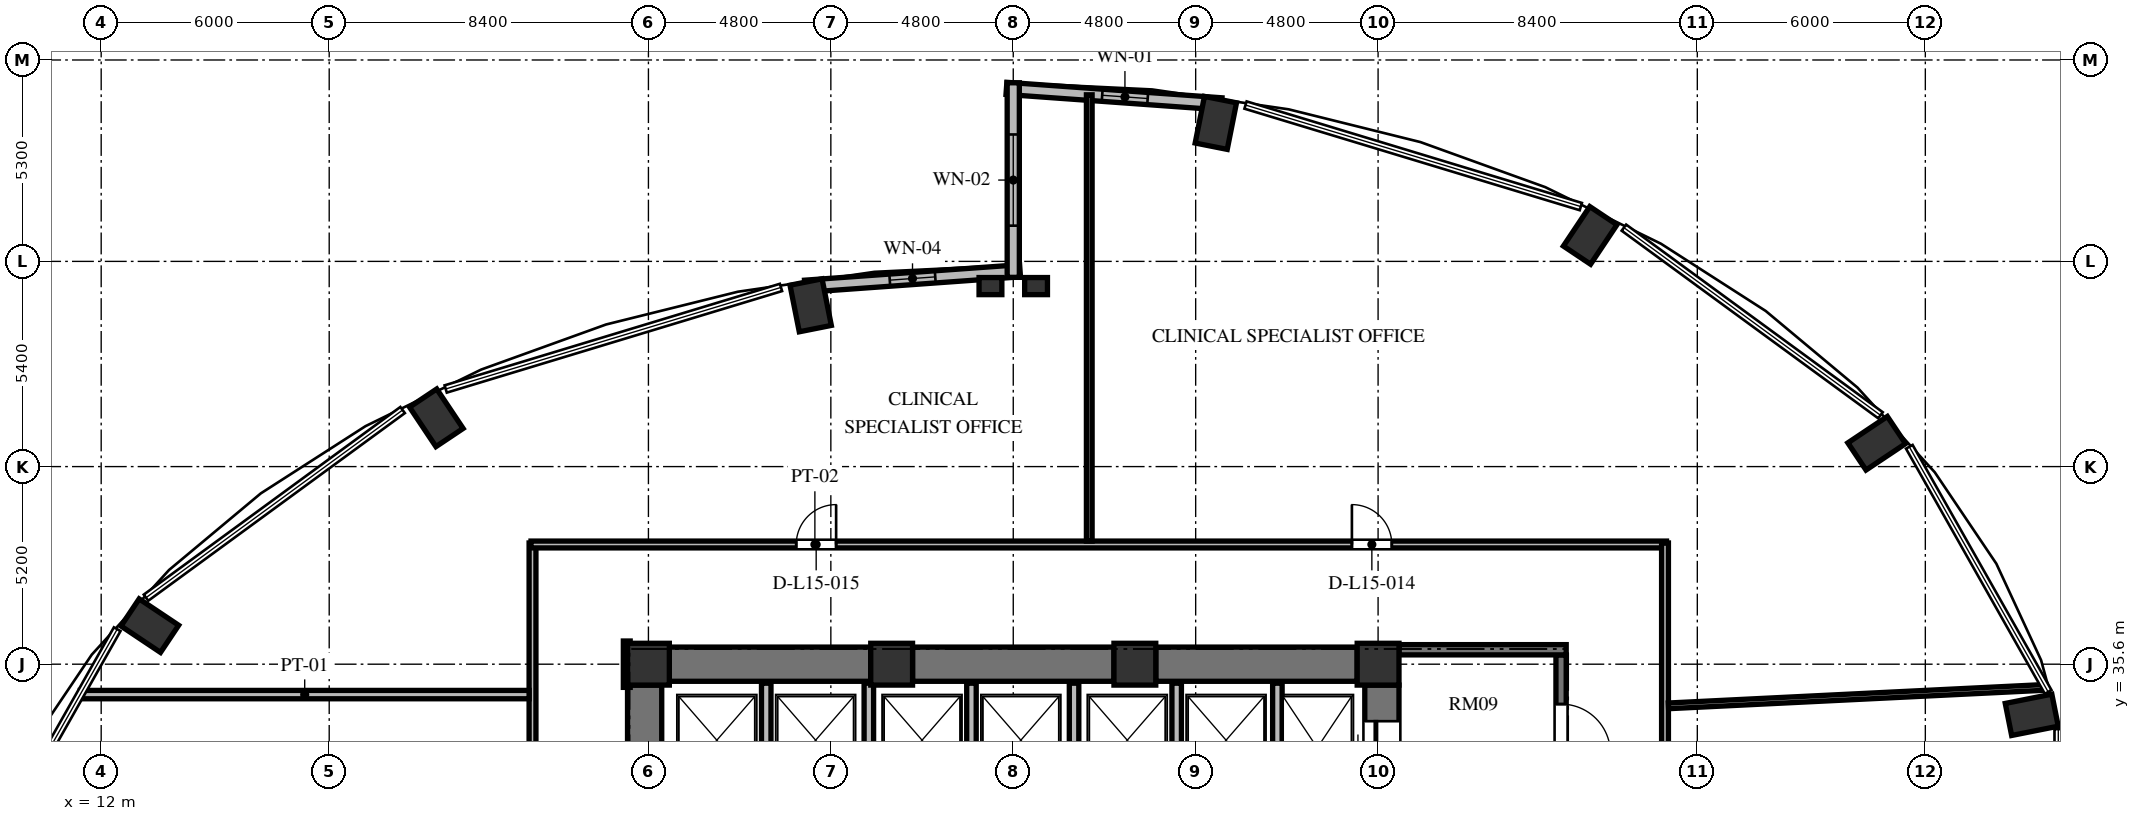
"""IFC4 building model, lengths in metres.
Left out: names, types, materials, properties, quantities, classifications, styles, units other than length and angle.
Written with IfcOpenShell. Run it as: python <this file> out.ifc"""

import sys

from ifc_helpers import new_model, si_unit, direction, frame, frame_2d, origin, origin_2d, place, context, subcontext, project, spatial, rectangle, extrude, element, fill, save


model = new_model("IFC4")
c1 = context("Model", 3, precision=1e-05, world=origin(), true_north=direction((0.0, 1.0)))
c2 = subcontext(c1, "Body", "Model", "MODEL_VIEW")
j1 = project(units=[si_unit("LENGTHUNIT", "METRE"), si_unit("PLANEANGLEUNIT", "RADIAN")], contexts=[c1])
p1 = place(None, origin())
s1 = spatial("IfcSite", under=j1, at=p1, CompositionType="ELEMENT")
p2 = place(p1, origin())
s2 = spatial("IfcBuilding", under=s1, at=p2, CompositionType="ELEMENT")
p3 = place(p2, frame((0.0, 0.0, 61.68)))
s3 = spatial("IfcBuildingStorey", under=s2, at=p3, CompositionType="ELEMENT", Elevation=61.68)
for number, where, z_axis, x_axis in (
    (1, (62.8, 34.268, 0.0), (0.0, 0.0, 1.0), (0.981, 0.195, 0.0)),
    (2, (58.72, 41.414, 0.0), (0.0, 0.0, 1.0), (0.831, 0.556, 0.0)),
    (3, (51.181, 46.884, 0.0), (0.0, 0.0, 1.0), (0.556, 0.831, 0.0)),
    (4, (41.331, 49.844, 0.0), (0.0, 0.0, 1.0), (0.195, 0.981, 0.0)),
    (5, (30.669, 45.044, 0.0), (0.0, 0.0, 1.0), (-0.195, 0.981, 0.0)),
    (6, (20.819, 42.084, 0.0), (0.0, 0.0, 1.0), (-0.556, 0.831, 0.0)),
    (7, (13.28, 36.614, 0.0), (0.0, 0.0, 1.0), (-0.831, 0.556, 0.0)),
):
    element("IfcColumn", number, at=place(p3, frame(where, z_axis=z_axis, x_axis=x_axis)), inside=s3, PredefinedType="COLUMN", context=c2, shape_type="SweptSolid", body=[
        extrude(rectangle(XDim=1.25, YDim=0.86, at=origin_2d()), origin(), (0.0, 0.0, 1.0), 3.648),
    ])
for number, where, z_axis, x_axis in (
    (8, (45.6, 35.6, 0.0), (0.0, 0.0, 1.0), (1.0, 0.0, 0.0)),
    (9, (39.2, 35.6, 0.0), (0.0, 0.0, 1.0), (1.0, 0.0, 0.0)),
    (10, (32.8, 35.6, 0.0), (0.0, 0.0, 1.0), (1.0, 0.0, 0.0)),
    (11, (26.4, 35.6, 0.0), (0.0, 0.0, 1.0), (1.0, 0.0, 0.0)),
):
    element("IfcColumn", number, at=place(p3, frame(where, z_axis=z_axis, x_axis=x_axis)), inside=s3, PredefinedType="COLUMN", context=c2, shape_type="SweptSolid", body=[
        extrude(rectangle(XDim=1.1, YDim=1.1, at=origin_2d()), origin(), (0.0, 0.0, 1.0), 3.648),
    ])
for number, where, z_axis, x_axis in (
    (12, (35.4, 45.55, 0.0), (0.0, 0.0, 1.0), (1.0, 0.0, 0.0)),
    (13, (36.6, 45.55, 0.0), (0.0, 0.0, 1.0), (1.0, 0.0, 0.0)),
):
    element("IfcColumn", number, at=place(p3, frame(where, z_axis=z_axis, x_axis=x_axis)), inside=s3, PredefinedType="PILASTER", context=c2, shape_type="SweptSolid", body=[
        extrude(rectangle(XDim=0.6, YDim=0.45, at=origin_2d()), origin(), (0.0, 0.0, 1.0), 3.648),
    ])
p4 = place(p3, frame((26.3, 20.95, 0.0), z_axis=(0.0, 0.0, 1.0), x_axis=(0.0, 1.0, 0.0)))
e14 = element("IfcWall", 14, at=p4, inside=s3, PredefinedType="SHEAR", context=c2, shape_type="SweptSolid", body=[
    extrude(rectangle(XDim=14.1, YDim=0.9, at=frame_2d((7.05, 0.0))), origin(), (0.0, 0.0, 1.0), 3.648),
])
p5 = place(p4, frame((6.5, 0.0, 0.0)))
e15 = element("IfcOpeningElement", 15, at=p5, cuts=e14, PredefinedType="OPENING", context=c2, shape_type="SweptSolid", body=[
    extrude(rectangle(XDim=1.2, YDim=2.15, at=frame_2d((0.6, 1.075))), frame((0.0, 0.46, 0.0), z_axis=(0.0, -1.0, 0.0), x_axis=(1.0, 0.0, 0.0)), (0.0, 0.0, 1.0), 0.92),
])
p6 = place(p4, frame((9.6, 0.0, 0.0)))
e16 = element("IfcOpeningElement", 16, at=p6, cuts=e14, PredefinedType="OPENING", context=c2, shape_type="SweptSolid", body=[
    extrude(rectangle(XDim=1.3, YDim=2.2, at=frame_2d((0.65, 1.1))), frame((0.0, 0.46, 0.0), z_axis=(0.0, -1.0, 0.0), x_axis=(1.0, 0.0, 0.0)), (0.0, 0.0, 1.0), 0.92),
])
p7 = place(p4, frame((3.26, 0.0, 0.0)))
e17 = element("IfcOpeningElement", 17, at=p7, cuts=e14, PredefinedType="OPENING", context=c2, shape_type="SweptSolid", body=[
    extrude(rectangle(XDim=1.3, YDim=2.2, at=frame_2d((0.65, 1.1))), frame((0.0, 0.46, 0.0), z_axis=(0.0, -1.0, 0.0), x_axis=(1.0, 0.0, 0.0)), (0.0, 0.0, 1.0), 0.92),
])
p8 = place(p3, frame((45.7, 20.95, 0.0), z_axis=(0.0, 0.0, 1.0), x_axis=(0.0, 1.0, 0.0)))
e18 = element("IfcWall", 18, at=p8, inside=s3, PredefinedType="SHEAR", context=c2, shape_type="SweptSolid", body=[
    extrude(rectangle(XDim=14.1, YDim=0.9, at=frame_2d((7.05, 0.0))), origin(), (0.0, 0.0, 1.0), 3.648),
])
p9 = place(p8, frame((11.75, 0.0, 0.0)))
e19 = element("IfcOpeningElement", 19, at=p9, cuts=e18, PredefinedType="OPENING", context=c2, shape_type="SweptSolid", body=[
    extrude(rectangle(XDim=1.4, YDim=2.3, at=frame_2d((0.7, 1.15))), frame((0.0, 0.46, 0.0), z_axis=(0.0, -1.0, 0.0), x_axis=(1.0, 0.0, 0.0)), (0.0, 0.0, 1.0), 0.92),
])
p10 = place(p8, frame((0.95, 0.0, 0.0)))
e20 = element("IfcOpeningElement", 20, at=p10, cuts=e18, PredefinedType="OPENING", context=c2, shape_type="SweptSolid", body=[
    extrude(rectangle(XDim=1.4, YDim=2.3, at=frame_2d((0.7, 1.15))), frame((0.0, 0.46, 0.0), z_axis=(0.0, -1.0, 0.0), x_axis=(1.0, 0.0, 0.0)), (0.0, 0.0, 1.0), 0.92),
])
p11 = place(p3, frame((26.95, 35.6, 0.0), z_axis=(0.0, 0.0, 1.0), x_axis=(1.0, 0.0, 0.0)))
e21 = element("IfcWall", 21, at=p11, inside=s3, PredefinedType="SHEAR", context=c2, shape_type="SweptSolid", body=[
    extrude(rectangle(XDim=5.3, YDim=0.9, at=frame_2d((2.65, 0.0))), origin(), (0.0, 0.0, 1.0), 3.648),
])
p12 = place(p3, frame((33.35, 35.6, 0.0), z_axis=(0.0, 0.0, 1.0), x_axis=(1.0, 0.0, 0.0)))
e22 = element("IfcWall", 22, at=p12, inside=s3, PredefinedType="SHEAR", context=c2, shape_type="SweptSolid", body=[
    extrude(rectangle(XDim=5.3, YDim=0.9, at=frame_2d((2.65, 0.0))), origin(), (0.0, 0.0, 1.0), 3.648),
])
p13 = place(p3, frame((39.75, 35.6, 0.0), z_axis=(0.0, 0.0, 1.0), x_axis=(1.0, 0.0, 0.0)))
e23 = element("IfcWall", 23, at=p13, inside=s3, PredefinedType="SHEAR", context=c2, shape_type="SweptSolid", body=[
    extrude(rectangle(XDim=5.3, YDim=0.9, at=frame_2d((2.65, 0.0))), origin(), (0.0, 0.0, 1.0), 3.648),
])
p14 = place(p3, frame((41.481, 50.346, 0.0), z_axis=(0.0, 0.0, 1.0), x_axis=(-0.997422321809, 0.071754525696, 0.0)))
e24 = element("IfcWall", 24, at=p14, inside=s3, PredefinedType="SOLIDWALL", context=c2, shape_type="SweptSolid", body=[
    extrude(rectangle(XDim=5.675, YDim=0.32, at=frame_2d((2.838, 0.0))), origin(), (0.0, 0.0, 1.0), 3.428),
])
p15 = place(p14, frame((1.949, 0.0, 0.85)))
e25 = element("IfcOpeningElement", 25, at=p15, cuts=e24, PredefinedType="OPENING", context=c2, shape_type="SweptSolid", body=[
    extrude(rectangle(XDim=1.2, YDim=2.2, at=frame_2d((0.6, 1.1))), frame((0.0, 0.17, 0.0), z_axis=(0.0, -1.0, 0.0), x_axis=(1.0, 0.0, 0.0)), (0.0, 0.0, 1.0), 0.34),
])
p16 = place(p3, frame((36.179, 45.953, 0.0), z_axis=(0.0, 0.0, 1.0), x_axis=(-0.997421878774, -0.071760683825, 0.0)))
e26 = element("IfcWall", 26, at=p16, inside=s3, PredefinedType="SOLIDWALL", context=c2, shape_type="SweptSolid", body=[
    extrude(rectangle(XDim=5.675, YDim=0.32, at=frame_2d((2.837, 0.0))), origin(), (0.0, 0.0, 1.0), 3.428),
])
p17 = place(p16, frame((2.237, 0.0, 0.85)))
e27 = element("IfcOpeningElement", 27, at=p17, cuts=e26, PredefinedType="OPENING", context=c2, shape_type="SweptSolid", body=[
    extrude(rectangle(XDim=1.2, YDim=1.8, at=frame_2d((0.6, 0.9))), frame((0.0, 0.17, 0.0), z_axis=(0.0, -1.0, 0.0), x_axis=(1.0, 0.0, 0.0)), (0.0, 0.0, 1.0), 0.34),
])
p18 = place(p3, frame((36.0, 50.9, 0.0), z_axis=(0.0, 0.0, 1.0), x_axis=(0.0, -1.0, 0.0)))
e28 = element("IfcWall", 28, at=p18, inside=s3, PredefinedType="SOLIDWALL", context=c2, shape_type="SweptSolid", body=[
    extrude(rectangle(XDim=5.12, YDim=0.32, at=frame_2d((2.56, 0.0))), origin(), (0.0, 0.0, 1.0), 3.428),
])
p19 = place(p18, frame((1.36, 0.0, 0.84)))
e29 = element("IfcOpeningElement", 29, at=p19, cuts=e28, PredefinedType="OPENING", context=c2, shape_type="SweptSolid", body=[
    extrude(rectangle(XDim=2.4, YDim=2.04, at=frame_2d((1.2, 1.02))), frame((0.0, 0.17, 0.0), z_axis=(0.0, -1.0, 0.0), x_axis=(1.0, 0.0, 0.0)), (0.0, 0.0, 1.0), 0.34),
])
p20 = place(p3, frame((42.95, 31.92, 0.0), z_axis=(0.0, 0.0, 1.0), x_axis=(0.0, 1.0, 0.0)))
e30 = element("IfcWall", 30, at=p20, inside=s3, PredefinedType="SOLIDWALL", context=c2, shape_type="SweptSolid", body=[
    extrude(rectangle(XDim=3.18, YDim=0.25, at=frame_2d((1.59, 0.0))), origin(), (0.0, 0.0, 1.0), 3.428),
])
for number, where, z_axis, x_axis in (
    (31, (29.5, 32.42, 0.0), (0.0, 0.0, 1.0), (0.0, 1.0, 0.0)),
    (32, (32.2, 32.42, 0.0), (0.0, 0.0, 1.0), (0.0, 1.0, 0.0)),
    (33, (34.9, 32.42, 0.0), (0.0, 0.0, 1.0), (0.0, 1.0, 0.0)),
    (34, (37.6, 32.42, 0.0), (0.0, 0.0, 1.0), (0.0, 1.0, 0.0)),
    (35, (40.3, 32.42, 0.0), (0.0, 0.0, 1.0), (0.0, 1.0, 0.0)),
):
    element("IfcWall", number, at=place(p3, frame(where, z_axis=z_axis, x_axis=x_axis)), inside=s3, PredefinedType="SOLIDWALL", context=c2, shape_type="SweptSolid", body=[
        extrude(rectangle(XDim=2.68, YDim=0.25, at=frame_2d((1.34, 0.0))), origin(), (0.0, 0.0, 1.0), 3.428),
    ])
p21 = place(p3, frame((50.415, 35.845, 0.0), z_axis=(0.0, 0.0, 1.0), x_axis=(0.0, -1.0, 0.0)))
e36 = element("IfcWall", 36, at=p21, inside=s3, PredefinedType="SHEAR", context=c2, shape_type="SweptSolid", body=[
    extrude(rectangle(XDim=15.825, YDim=0.27, at=frame_2d((7.913, 0.0))), origin(), (0.0, 0.0, 1.0), 3.648),
])
p22 = place(p21, frame((4.445, 0.0, 0.0)))
e37 = element("IfcOpeningElement", 37, at=p22, cuts=e36, PredefinedType="OPENING", context=c2, shape_type="SweptSolid", body=[
    extrude(rectangle(XDim=1.2, YDim=2.15, at=frame_2d((0.6, 1.075))), frame((0.0, 0.145, 0.0), z_axis=(0.0, -1.0, 0.0), x_axis=(1.0, 0.0, 0.0)), (0.0, 0.0, 1.0), 0.29),
])
p23 = place(p21, frame((1.295, 0.0, 0.0)))
e38 = element("IfcOpeningElement", 38, at=p23, cuts=e36, PredefinedType="OPENING", context=c2, shape_type="SweptSolid", body=[
    extrude(rectangle(XDim=1.3, YDim=2.2, at=frame_2d((0.65, 1.1))), frame((0.0, 0.145, 0.0), z_axis=(0.0, -1.0, 0.0), x_axis=(1.0, 0.0, 0.0)), (0.0, 0.0, 1.0), 0.29),
])
p24 = place(p21, frame((13.095, 0.0, 0.0)))
e39 = element("IfcOpeningElement", 39, at=p24, cuts=e36, PredefinedType="OPENING", context=c2, shape_type="SweptSolid", body=[
    extrude(rectangle(XDim=1.3, YDim=2.2, at=frame_2d((0.65, 1.1))), frame((0.0, 0.145, 0.0), z_axis=(0.0, -1.0, 0.0), x_axis=(1.0, 0.0, 0.0)), (0.0, 0.0, 1.0), 0.29),
])
p25 = place(p3, frame((46.15, 35.98, 0.0), z_axis=(0.0, 0.0, 1.0), x_axis=(1.0, 0.0, 0.0)))
e40 = element("IfcWall", 40, at=p25, inside=s3, PredefinedType="SHEAR", context=c2, shape_type="SweptSolid", body=[
    extrude(rectangle(XDim=4.4, YDim=0.27, at=frame_2d((2.2, 0.0))), origin(), (0.0, 0.0, 1.0), 3.648),
])
p26 = place(p3, frame((23.35, 29.36, 0.0), z_axis=(0.0, 0.0, 1.0), x_axis=(0.0, 1.0, 0.0)))
e41 = element("IfcWall", 41, at=p26, inside=s3, PredefinedType="PARTITIONING", context=c2, shape_type="SweptSolid", body=[
    extrude(rectangle(XDim=9.43, YDim=0.18, at=frame_2d((4.715, 0.0))), origin(), (0.0, 0.0, 1.0), 3.428),
])
p27 = place(p3, frame((23.31, 38.75, 0.0), z_axis=(0.0, 0.0, 1.0), x_axis=(1.0, 0.0, 0.0)))
e42 = element("IfcWall", 42, at=p27, inside=s3, PredefinedType="PARTITIONING", context=c2, shape_type="SweptSolid", body=[
    extrude(rectangle(XDim=29.88, YDim=0.18, at=frame_2d((14.94, 0.0))), origin(), (0.0, 0.0, 1.0), 3.053),
])
p28 = place(p27, frame((21.601, 0.0, 0.0)))
e43 = element("IfcOpeningElement", 43, at=p28, cuts=e42, PredefinedType="OPENING", context=c2, shape_type="SweptSolid", body=[
    extrude(rectangle(XDim=1.05, YDim=2.15, at=frame_2d((0.525, 1.075))), frame((0.0, 0.1, 0.0), z_axis=(0.0, -1.0, 0.0), x_axis=(1.0, 0.0, 0.0)), (0.0, 0.0, 1.0), 0.2),
])
p29 = place(p27, frame((6.979, 0.0, 0.0)))
e44 = element("IfcOpeningElement", 44, at=p29, cuts=e42, PredefinedType="OPENING", context=c2, shape_type="SweptSolid", body=[
    extrude(rectangle(XDim=1.05, YDim=2.15, at=frame_2d((0.525, 1.075))), frame((0.0, 0.1, 0.0), z_axis=(0.0, -1.0, 0.0), x_axis=(1.0, 0.0, 0.0)), (0.0, 0.0, 1.0), 0.2),
])
p30 = place(p3, frame((53.15, 38.79, 0.0), z_axis=(0.0, 0.0, 1.0), x_axis=(0.0, -1.0, 0.0)))
e45 = element("IfcWall", 45, at=p30, inside=s3, PredefinedType="PARTITIONING", context=c2, shape_type="SweptSolid", body=[
    extrude(rectangle(XDim=9.43, YDim=0.18, at=frame_2d((4.715, 0.0))), origin(), (0.0, 0.0, 1.0), 3.428),
])
p31 = place(p3, frame((25.83, 36.21, 0.0), z_axis=(0.0, 0.0, 1.0), x_axis=(0.0, -1.0, 0.0)))
e46 = element("IfcWall", 46, at=p31, inside=s3, PredefinedType="PARTITIONING", context=c2, shape_type="SweptSolid", body=[
    extrude(rectangle(XDim=1.22, YDim=0.18, at=frame_2d((0.61, 0.0))), origin(), (0.0, 0.0, 1.0), 3.428),
])
p32 = place(p3, frame((11.451, 34.8, 0.0), z_axis=(0.0, 0.0, 1.0), x_axis=(1.0, 0.0, 0.0)))
e47 = element("IfcWall", 47, at=p32, inside=s3, PredefinedType="PARTITIONING", context=c2, shape_type="SweptSolid", body=[
    extrude(rectangle(XDim=11.809, YDim=0.22, at=frame_2d((5.905, 0.0))), origin(), (0.0, 0.0, 1.0), 3.428),
])
p33 = place(p3, frame((53.24, 34.504, 0.0), z_axis=(0.0, 0.0, 1.0), x_axis=(0.998798003682, 0.049015791742, 0.0)))
e48 = element("IfcWall", 48, at=p33, inside=s3, PredefinedType="PARTITIONING", context=c2, shape_type="SweptSolid", body=[
    extrude(rectangle(XDim=9.947, YDim=0.15, at=frame_2d((4.973, 0.0))), origin(), (0.0, 0.0, 1.0), 2.813),
])
p34 = place(p3, frame((38.0, 38.84, 0.0), z_axis=(0.0, 0.0, 1.0), x_axis=(0.0, 1.0, 0.0)))
e49 = element("IfcWall", 49, at=p34, inside=s3, PredefinedType="PARTITIONING", context=c2, shape_type="SweptSolid", body=[
    extrude(rectangle(XDim=11.743, YDim=0.15, at=frame_2d((5.872, 0.0))), origin(), (0.0, 0.0, 1.0), 3.428),
])
p35 = place(p15, origin())
e50 = element("IfcWindow", 50, at=p35, inside=s3, PartitioningType="SINGLE_PANEL", PredefinedType="WINDOW", context=c2, shape_type="SweptSolid", body=[
    extrude(rectangle(XDim=1.2, YDim=2.2, at=frame_2d((0.6, 1.1))), frame((0.0, 0.03, 0.0), z_axis=(0.0, -1.0, 0.0), x_axis=(1.0, 0.0, 0.0)), (0.0, 0.0, 1.0), 0.06),
])
fill(e25, e50)
p36 = place(p17, origin())
e51 = element("IfcWindow", 51, at=p36, inside=s3, PartitioningType="SINGLE_PANEL", PredefinedType="WINDOW", context=c2, shape_type="SweptSolid", body=[
    extrude(rectangle(XDim=1.2, YDim=1.8, at=frame_2d((0.6, 0.9))), frame((0.0, 0.03, 0.0), z_axis=(0.0, -1.0, 0.0), x_axis=(1.0, 0.0, 0.0)), (0.0, 0.0, 1.0), 0.06),
])
fill(e27, e51)
p37 = place(p19, origin())
e52 = element("IfcWindow", 52, at=p37, inside=s3, PartitioningType="SINGLE_PANEL", PredefinedType="WINDOW", context=c2, shape_type="SweptSolid", body=[
    extrude(rectangle(XDim=2.4, YDim=2.04, at=frame_2d((1.2, 1.02))), frame((0.0, 0.03, 0.0), z_axis=(0.0, -1.0, 0.0), x_axis=(1.0, 0.0, 0.0)), (0.0, 0.0, 1.0), 0.06),
])
fill(e29, e52)
p38 = place(p9, origin())
e53 = element("IfcDoor", 53, at=p38, inside=s3, OperationType="SLIDING_TO_LEFT", PredefinedType="DOOR", context=c2, shape_type="SweptSolid", body=[
    extrude(rectangle(XDim=1.4, YDim=2.3, at=frame_2d((0.7, 1.15))), frame((0.0, 0.025, 0.0), z_axis=(0.0, -1.0, 0.0), x_axis=(1.0, 0.0, 0.0)), (0.0, 0.0, 1.0), 0.05),
])
fill(e19, e53)
p39 = place(p23, origin())
e54 = element("IfcDoor", 54, at=p39, inside=s3, OperationType="SINGLE_SWING_RIGHT", PredefinedType="DOOR", context=c2, shape_type="SweptSolid", body=[
    extrude(rectangle(XDim=1.3, YDim=2.2, at=frame_2d((0.65, 1.1))), frame((0.0, 0.025, 0.0), z_axis=(0.0, -1.0, 0.0), x_axis=(1.0, 0.0, 0.0)), (0.0, 0.0, 1.0), 0.05),
])
fill(e38, e54)
p40 = place(p28, origin())
e55 = element("IfcDoor", 55, at=p40, inside=s3, OperationType="SINGLE_SWING_LEFT", PredefinedType="DOOR", context=c2, shape_type="SweptSolid", body=[
    extrude(rectangle(XDim=1.05, YDim=2.15, at=frame_2d((0.525, 1.075))), frame((0.0, 0.025, 0.0), z_axis=(0.0, -1.0, 0.0), x_axis=(1.0, 0.0, 0.0)), (0.0, 0.0, 1.0), 0.05),
])
fill(e43, e55)
p41 = place(p29, origin())
e56 = element("IfcDoor", 56, at=p41, inside=s3, OperationType="SINGLE_SWING_RIGHT", PredefinedType="DOOR", context=c2, shape_type="SweptSolid", body=[
    extrude(rectangle(XDim=1.05, YDim=2.15, at=frame_2d((0.525, 1.075))), frame((0.0, 0.025, 0.0), z_axis=(0.0, -1.0, 0.0), x_axis=(1.0, 0.0, 0.0)), (0.0, 0.0, 1.0), 0.05),
])
fill(e44, e56)
save(model, sys.argv[1])
